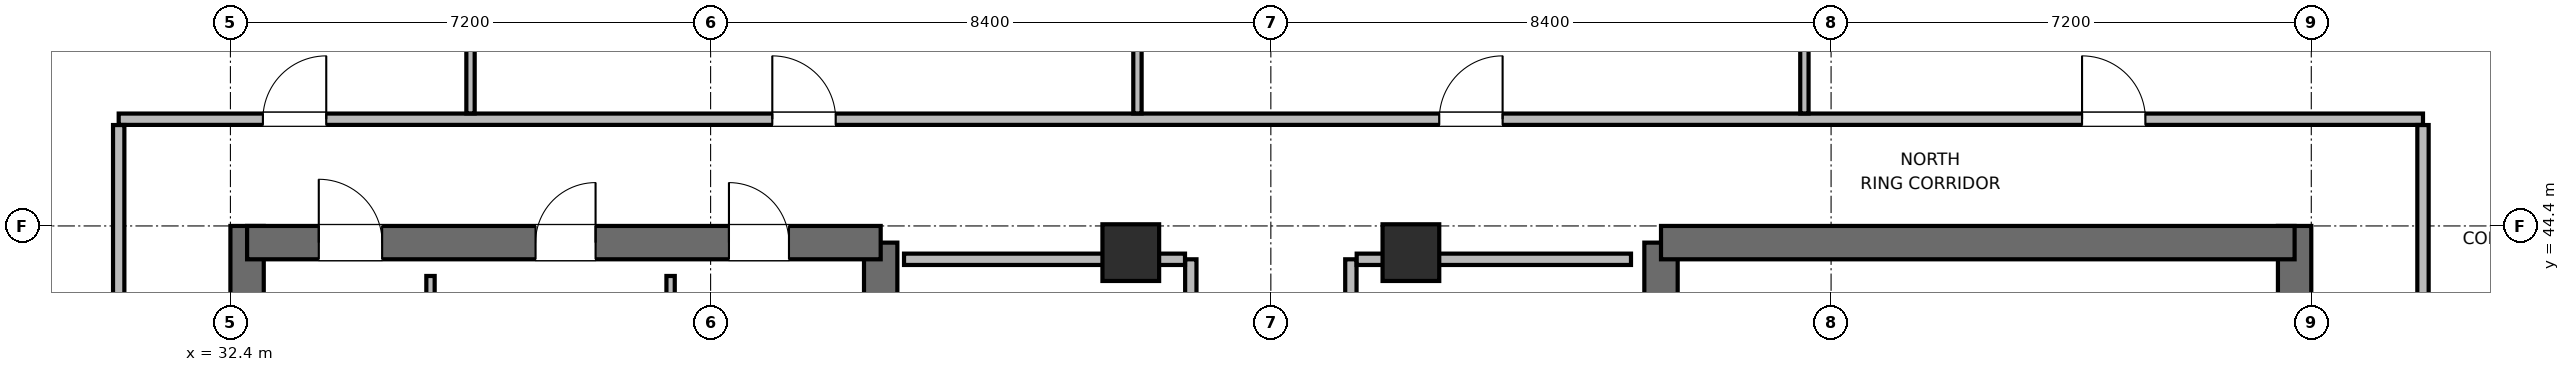
"""IFC4 building model, lengths in metres.
Left out: names, types, materials, properties, quantities, classifications, styles, units other than length and angle.
Written with IfcOpenShell. Run it as: python <this file> out.ifc"""

import sys

from ifc_helpers import new_model, si_unit, direction, frame, frame_2d, origin, origin_2d, place, context, subcontext, project, spatial, rectangle, extrude, element, fill, save


model = new_model("IFC4")
c1 = context("Model", 3, precision=1e-05, world=origin(), true_north=direction((0.0, 1.0)))
c2 = subcontext(c1, "Body", "Model", "MODEL_VIEW")
j1 = project(units=[si_unit("LENGTHUNIT", "METRE"), si_unit("PLANEANGLEUNIT", "RADIAN")], contexts=[c1])
p1 = place(None, origin())
s1 = spatial("IfcSite", under=j1, at=p1, CompositionType="ELEMENT")
p2 = place(p1, origin())
s2 = spatial("IfcBuilding", under=s1, at=p2, CompositionType="ELEMENT")
p3 = place(p2, frame((0.0, 0.0, 314.1)))
s3 = spatial("IfcBuildingStorey", under=s2, at=p3, CompositionType="ELEMENT", Elevation=314.1)
p4 = place(p3, frame((32.65, 27.6, 0.0), z_axis=(0.0, 0.0, 1.0), x_axis=(0.0, 1.0, 0.0)))
e1 = element("IfcWall", 1, at=p4, inside=s3, PredefinedType="SHEAR", context=c2, shape_type="SweptSolid", body=[
    extrude(rectangle(XDim=16.8, YDim=0.5, at=frame_2d((8.4, 0.0))), origin(), (0.0, 0.0, 1.0), 3.9),
])
p5 = place(p3, frame((42.15, 37.8, 0.0), z_axis=(0.0, 0.0, 1.0), x_axis=(0.0, 1.0, 0.0)))
e2 = element("IfcWall", 2, at=p5, inside=s3, PredefinedType="SHEAR", context=c2, shape_type="SweptSolid", body=[
    extrude(rectangle(XDim=6.35, YDim=0.5, at=frame_2d((3.175, 0.0))), origin(), (0.0, 0.0, 1.0), 3.9),
])
p6 = place(p3, frame((32.65, 44.15, 0.0), z_axis=(0.0, 0.0, 1.0), x_axis=(1.0, 0.0, 0.0)))
e3 = element("IfcWall", 3, at=p6, inside=s3, PredefinedType="SHEAR", context=c2, shape_type="SweptSolid", body=[
    extrude(rectangle(XDim=9.5, YDim=0.5, at=frame_2d((4.75, 0.0))), origin(), (0.0, 0.0, 1.0), 3.9),
])
p7 = place(p6, frame((1.075, 0.0, 0.0)))
e4 = element("IfcOpeningElement", 4, at=p7, cuts=e3, PredefinedType="OPENING", context=c2, shape_type="SweptSolid", body=[
    extrude(rectangle(XDim=0.95, YDim=2.04, at=frame_2d((0.475, 1.02))), frame((0.0, 0.26, 0.0), z_axis=(0.0, -1.0, 0.0), x_axis=(1.0, 0.0, 0.0)), (0.0, 0.0, 1.0), 0.52),
])
p8 = place(p6, frame((4.325, 0.0, 0.0)))
e5 = element("IfcOpeningElement", 5, at=p8, cuts=e3, PredefinedType="OPENING", context=c2, shape_type="SweptSolid", body=[
    extrude(rectangle(XDim=0.9, YDim=2.02, at=frame_2d((0.45, 1.01))), frame((0.0, 0.26, 0.0), z_axis=(0.0, -1.0, 0.0), x_axis=(1.0, 0.0, 0.0)), (0.0, 0.0, 1.0), 0.52),
])
p9 = place(p6, frame((7.225, 0.0, 0.0)))
e6 = element("IfcOpeningElement", 6, at=p9, cuts=e3, PredefinedType="OPENING", context=c2, shape_type="SweptSolid", body=[
    extrude(rectangle(XDim=0.9, YDim=2.02, at=frame_2d((0.45, 1.01))), frame((0.0, 0.26, 0.0), z_axis=(0.0, -1.0, 0.0), x_axis=(1.0, 0.0, 0.0)), (0.0, 0.0, 1.0), 0.52),
])
p10 = place(p3, frame((53.85, 38.0, 0.0), z_axis=(0.0, 0.0, 1.0), x_axis=(0.0, 1.0, 0.0)))
e7 = element("IfcWall", 7, at=p10, inside=s3, PredefinedType="SHEAR", context=c2, shape_type="SweptSolid", body=[
    extrude(rectangle(XDim=6.15, YDim=0.5, at=frame_2d((3.075, 0.0))), origin(), (0.0, 0.0, 1.0), 3.9),
])
p11 = place(p3, frame((63.35, 27.6, 0.0), z_axis=(0.0, 0.0, 1.0), x_axis=(0.0, 1.0, 0.0)))
e8 = element("IfcWall", 8, at=p11, inside=s3, PredefinedType="SHEAR", context=c2, shape_type="SweptSolid", body=[
    extrude(rectangle(XDim=16.8, YDim=0.5, at=frame_2d((8.4, 0.0))), origin(), (0.0, 0.0, 1.0), 3.9),
])
p12 = place(p3, frame((53.85, 44.15, 0.0), z_axis=(0.0, 0.0, 1.0), x_axis=(1.0, 0.0, 0.0)))
e9 = element("IfcWall", 9, at=p12, inside=s3, PredefinedType="SHEAR", context=c2, shape_type="SweptSolid", body=[
    extrude(rectangle(XDim=9.5, YDim=0.5, at=frame_2d((4.75, 0.0))), origin(), (0.0, 0.0, 1.0), 3.9),
])
for number, where, z_axis, x_axis in (
    (10, (45.9, 44.0, 0.0), (0.0, 0.0, 1.0), (1.0, 0.0, 0.0)),
    (11, (50.1, 44.0, 0.0), (0.0, 0.0, 1.0), (1.0, 0.0, 0.0)),
):
    element("IfcColumn", number, at=place(p3, frame(where, z_axis=z_axis, x_axis=x_axis)), inside=s3, PredefinedType="COLUMN", context=c2, shape_type="SweptSolid", body=[
        extrude(rectangle(XDim=0.85, YDim=0.85, at=origin_2d()), origin(), (0.0, 0.0, 1.0), 3.9),
    ])
for number, where, z_axis, x_axis in (
    (12, (35.4, 41.095, 0.0), (0.0, 0.0, 1.0), (0.0, 1.0, 0.0)),
    (13, (39.0, 41.095, 0.0), (0.0, 0.0, 1.0), (0.0, 1.0, 0.0)),
):
    element("IfcWall", number, at=place(p3, frame(where, z_axis=z_axis, x_axis=x_axis)), inside=s3, PredefinedType="PARTITIONING", context=c2, shape_type="SweptSolid", body=[
        extrude(rectangle(XDim=2.555, YDim=0.125, at=frame_2d((1.277, 0.0))), origin(), (0.0, 0.0, 1.0), 3.68),
    ])
p13 = place(p3, frame((46.8, 37.9, 0.0), z_axis=(0.0, 0.0, 1.0), x_axis=(0.0, 1.0, 0.0)))
e14 = element("IfcWall", 14, at=p13, inside=s3, PredefinedType="PARTITIONING", context=c2, shape_type="SweptSolid", body=[
    extrude(rectangle(XDim=6.0, YDim=0.17, at=frame_2d((3.0, 0.0))), origin(), (0.0, 0.0, 1.0), 3.68),
])
p14 = place(p13, frame((1.47, 0.0, 0.0)))
e15 = element("IfcOpeningElement", 15, at=p14, cuts=e14, PredefinedType="OPENING", context=c2, shape_type="SweptSolid", body=[
    extrude(rectangle(XDim=0.9, YDim=2.02, at=frame_2d((0.45, 1.01))), frame((0.0, 0.095, 0.0), z_axis=(0.0, -1.0, 0.0), x_axis=(1.0, 0.0, 0.0)), (0.0, 0.0, 1.0), 0.19),
])
p15 = place(p13, frame((4.47, 0.0, 0.0)))
e16 = element("IfcOpeningElement", 16, at=p15, cuts=e14, PredefinedType="OPENING", context=c2, shape_type="SweptSolid", body=[
    extrude(rectangle(XDim=0.9, YDim=2.02, at=frame_2d((0.45, 1.01))), frame((0.0, 0.095, 0.0), z_axis=(0.0, -1.0, 0.0), x_axis=(1.0, 0.0, 0.0)), (0.0, 0.0, 1.0), 0.19),
])
p16 = place(p3, frame((42.5, 43.9, 0.0), z_axis=(0.0, 0.0, 1.0), x_axis=(1.0, 0.0, 0.0)))
e17 = element("IfcWall", 17, at=p16, inside=s3, PredefinedType="PARTITIONING", context=c2, shape_type="SweptSolid", body=[
    extrude(rectangle(XDim=4.213, YDim=0.17, at=frame_2d((2.106, 0.0))), origin(), (0.0, 0.0, 1.0), 2.765),
])
p17 = place(p3, frame((49.2, 37.9, 0.0), z_axis=(0.0, 0.0, 1.0), x_axis=(0.0, 1.0, 0.0)))
e18 = element("IfcWall", 18, at=p17, inside=s3, PredefinedType="PARTITIONING", context=c2, shape_type="SweptSolid", body=[
    extrude(rectangle(XDim=6.0, YDim=0.17, at=frame_2d((3.0, 0.0))), origin(), (0.0, 0.0, 1.0), 3.68),
])
p18 = place(p17, frame((2.55, 0.0, 0.0)))
e19 = element("IfcOpeningElement", 19, at=p18, cuts=e18, PredefinedType="OPENING", context=c2, shape_type="SweptSolid", body=[
    extrude(rectangle(XDim=0.9, YDim=2.02, at=frame_2d((0.45, 1.01))), frame((0.0, 0.095, 0.0), z_axis=(0.0, -1.0, 0.0), x_axis=(1.0, 0.0, 0.0)), (0.0, 0.0, 1.0), 0.19),
])
p19 = place(p3, frame((49.287, 43.9, 0.0), z_axis=(0.0, 0.0, 1.0), x_axis=(1.0, 0.0, 0.0)))
e20 = element("IfcWall", 20, at=p19, inside=s3, PredefinedType="PARTITIONING", context=c2, shape_type="SweptSolid", body=[
    extrude(rectangle(XDim=4.113, YDim=0.17, at=frame_2d((2.056, 0.0))), origin(), (0.0, 0.0, 1.0), 2.765),
])
p20 = place(p3, frame((30.725, 46.0, 0.0), z_axis=(0.0, 0.0, 1.0), x_axis=(1.0, 0.0, 0.0)))
e21 = element("IfcWall", 21, at=p20, inside=s3, PredefinedType="PARTITIONING", context=c2, shape_type="SweptSolid", body=[
    extrude(rectangle(XDim=34.55, YDim=0.17, at=frame_2d((17.275, 0.0))), origin(), (0.0, 0.0, 1.0), 3.68),
])
p21 = place(p20, frame((2.162, 0.0, 0.0)))
e22 = element("IfcOpeningElement", 22, at=p21, cuts=e21, PredefinedType="OPENING", context=c2, shape_type="SweptSolid", body=[
    extrude(rectangle(XDim=0.95, YDim=2.04, at=frame_2d((0.475, 1.02))), frame((0.0, 0.095, 0.0), z_axis=(0.0, -1.0, 0.0), x_axis=(1.0, 0.0, 0.0)), (0.0, 0.0, 1.0), 0.19),
])
p22 = place(p20, frame((9.8, 0.0, 0.0)))
e23 = element("IfcOpeningElement", 23, at=p22, cuts=e21, PredefinedType="OPENING", context=c2, shape_type="SweptSolid", body=[
    extrude(rectangle(XDim=0.95, YDim=2.04, at=frame_2d((0.475, 1.02))), frame((0.0, 0.095, 0.0), z_axis=(0.0, -1.0, 0.0), x_axis=(1.0, 0.0, 0.0)), (0.0, 0.0, 1.0), 0.19),
])
p23 = place(p20, frame((19.8, 0.0, 0.0)))
e24 = element("IfcOpeningElement", 24, at=p23, cuts=e21, PredefinedType="OPENING", context=c2, shape_type="SweptSolid", body=[
    extrude(rectangle(XDim=0.95, YDim=2.04, at=frame_2d((0.475, 1.02))), frame((0.0, 0.095, 0.0), z_axis=(0.0, -1.0, 0.0), x_axis=(1.0, 0.0, 0.0)), (0.0, 0.0, 1.0), 0.19),
])
p24 = place(p20, frame((29.438, 0.0, 0.0)))
e25 = element("IfcOpeningElement", 25, at=p24, cuts=e21, PredefinedType="OPENING", context=c2, shape_type="SweptSolid", body=[
    extrude(rectangle(XDim=0.95, YDim=2.04, at=frame_2d((0.475, 1.02))), frame((0.0, 0.095, 0.0), z_axis=(0.0, -1.0, 0.0), x_axis=(1.0, 0.0, 0.0)), (0.0, 0.0, 1.0), 0.19),
])
p25 = place(p3, frame((30.725, 26.087, 0.0), z_axis=(0.0, 0.0, 1.0), x_axis=(0.0, 1.0, 0.0)))
e26 = element("IfcWall", 26, at=p25, inside=s3, PredefinedType="PARTITIONING", context=c2, shape_type="SweptSolid", body=[
    extrude(rectangle(XDim=19.826, YDim=0.17, at=frame_2d((9.913, 0.0))), origin(), (0.0, 0.0, 1.0), 3.68),
])
p26 = place(p25, frame((9.438, 0.0, 0.0)))
e27 = element("IfcOpeningElement", 27, at=p26, cuts=e26, PredefinedType="OPENING", context=c2, shape_type="SweptSolid", body=[
    extrude(rectangle(XDim=0.95, YDim=2.04, at=frame_2d((0.475, 1.02))), frame((0.0, 0.095, 0.0), z_axis=(0.0, -1.0, 0.0), x_axis=(1.0, 0.0, 0.0)), (0.0, 0.0, 1.0), 0.19),
])
p27 = place(p3, frame((65.275, 26.087, 0.0), z_axis=(0.0, 0.0, 1.0), x_axis=(0.0, 1.0, 0.0)))
e28 = element("IfcWall", 28, at=p27, inside=s3, PredefinedType="PARTITIONING", context=c2, shape_type="SweptSolid", body=[
    extrude(rectangle(XDim=19.826, YDim=0.17, at=frame_2d((9.913, 0.0))), origin(), (0.0, 0.0, 1.0), 3.68),
])
p28 = place(p27, frame((3.938, 0.0, 0.0)))
e29 = element("IfcOpeningElement", 29, at=p28, cuts=e28, PredefinedType="OPENING", context=c2, shape_type="SweptSolid", body=[
    extrude(rectangle(XDim=0.95, YDim=2.04, at=frame_2d((0.475, 1.02))), frame((0.0, 0.095, 0.0), z_axis=(0.0, -1.0, 0.0), x_axis=(1.0, 0.0, 0.0)), (0.0, 0.0, 1.0), 0.19),
])
p29 = place(p27, frame((13.938, 0.0, 0.0)))
e30 = element("IfcOpeningElement", 30, at=p29, cuts=e28, PredefinedType="OPENING", context=c2, shape_type="SweptSolid", body=[
    extrude(rectangle(XDim=0.95, YDim=2.04, at=frame_2d((0.475, 1.02))), frame((0.0, 0.095, 0.0), z_axis=(0.0, -1.0, 0.0), x_axis=(1.0, 0.0, 0.0)), (0.0, 0.0, 1.0), 0.19),
])
p30 = place(p3, frame((36.0, 46.087, 0.0), z_axis=(0.0, 0.0, 1.0), x_axis=(0.0, 1.0, 0.0)))
e31 = element("IfcWall", 31, at=p30, inside=s3, PredefinedType="PARTITIONING", context=c2, shape_type="SweptSolid", body=[
    extrude(rectangle(XDim=7.078, YDim=0.125, at=frame_2d((3.539, 0.0))), origin(), (0.0, 0.0, 1.0), 3.68),
])
p31 = place(p3, frame((46.0, 46.087, 0.0), z_axis=(0.0, 0.0, 1.0), x_axis=(0.0, 1.0, 0.0)))
e32 = element("IfcWall", 32, at=p31, inside=s3, PredefinedType="PARTITIONING", context=c2, shape_type="SweptSolid", body=[
    extrude(rectangle(XDim=5.838, YDim=0.125, at=frame_2d((2.919, 0.0))), origin(), (0.0, 0.0, 1.0), 3.68),
])
p32 = place(p3, frame((56.0, 46.087, 0.0), z_axis=(0.0, 0.0, 1.0), x_axis=(0.0, 1.0, 0.0)))
e33 = element("IfcWall", 33, at=p32, inside=s3, PredefinedType="PARTITIONING", context=c2, shape_type="SweptSolid", body=[
    extrude(rectangle(XDim=7.038, YDim=0.125, at=frame_2d((3.519, 0.0))), origin(), (0.0, 0.0, 1.0), 3.043),
])
p33 = place(p7, origin())
e34 = element("IfcDoor", 34, at=p33, inside=s3, OperationType="SINGLE_SWING_LEFT", PredefinedType="DOOR", context=c2, shape_type="SweptSolid", body=[
    extrude(rectangle(XDim=0.95, YDim=2.04, at=frame_2d((0.475, 1.02))), frame((0.0, 0.025, 0.0), z_axis=(0.0, -1.0, 0.0), x_axis=(1.0, 0.0, 0.0)), (0.0, 0.0, 1.0), 0.05),
])
fill(e4, e34)
p34 = place(p8, origin())
e35 = element("IfcDoor", 35, at=p34, inside=s3, OperationType="SINGLE_SWING_RIGHT", PredefinedType="DOOR", context=c2, shape_type="SweptSolid", body=[
    extrude(rectangle(XDim=0.9, YDim=2.02, at=frame_2d((0.45, 1.01))), frame((0.0, 0.025, 0.0), z_axis=(0.0, -1.0, 0.0), x_axis=(1.0, 0.0, 0.0)), (0.0, 0.0, 1.0), 0.05),
])
fill(e5, e35)
p35 = place(p9, origin())
e36 = element("IfcDoor", 36, at=p35, inside=s3, OperationType="SINGLE_SWING_LEFT", PredefinedType="DOOR", context=c2, shape_type="SweptSolid", body=[
    extrude(rectangle(XDim=0.9, YDim=2.02, at=frame_2d((0.45, 1.01))), frame((0.0, 0.025, 0.0), z_axis=(0.0, -1.0, 0.0), x_axis=(1.0, 0.0, 0.0)), (0.0, 0.0, 1.0), 0.05),
])
fill(e6, e36)
p36 = place(p21, origin())
e37 = element("IfcDoor", 37, at=p36, inside=s3, OperationType="SINGLE_SWING_RIGHT", PredefinedType="DOOR", context=c2, shape_type="SweptSolid", body=[
    extrude(rectangle(XDim=0.95, YDim=2.04, at=frame_2d((0.475, 1.02))), frame((0.0, 0.025, 0.0), z_axis=(0.0, -1.0, 0.0), x_axis=(1.0, 0.0, 0.0)), (0.0, 0.0, 1.0), 0.05),
])
fill(e22, e37)
p37 = place(p22, origin())
e38 = element("IfcDoor", 38, at=p37, inside=s3, OperationType="SINGLE_SWING_LEFT", PredefinedType="DOOR", context=c2, shape_type="SweptSolid", body=[
    extrude(rectangle(XDim=0.95, YDim=2.04, at=frame_2d((0.475, 1.02))), frame((0.0, 0.025, 0.0), z_axis=(0.0, -1.0, 0.0), x_axis=(1.0, 0.0, 0.0)), (0.0, 0.0, 1.0), 0.05),
])
fill(e23, e38)
p38 = place(p23, origin())
e39 = element("IfcDoor", 39, at=p38, inside=s3, OperationType="SINGLE_SWING_RIGHT", PredefinedType="DOOR", context=c2, shape_type="SweptSolid", body=[
    extrude(rectangle(XDim=0.95, YDim=2.04, at=frame_2d((0.475, 1.02))), frame((0.0, 0.025, 0.0), z_axis=(0.0, -1.0, 0.0), x_axis=(1.0, 0.0, 0.0)), (0.0, 0.0, 1.0), 0.05),
])
fill(e24, e39)
p39 = place(p24, origin())
e40 = element("IfcDoor", 40, at=p39, inside=s3, OperationType="SINGLE_SWING_LEFT", PredefinedType="DOOR", context=c2, shape_type="SweptSolid", body=[
    extrude(rectangle(XDim=0.95, YDim=2.04, at=frame_2d((0.475, 1.02))), frame((0.0, 0.025, 0.0), z_axis=(0.0, -1.0, 0.0), x_axis=(1.0, 0.0, 0.0)), (0.0, 0.0, 1.0), 0.05),
])
fill(e25, e40)
save(model, sys.argv[1])
